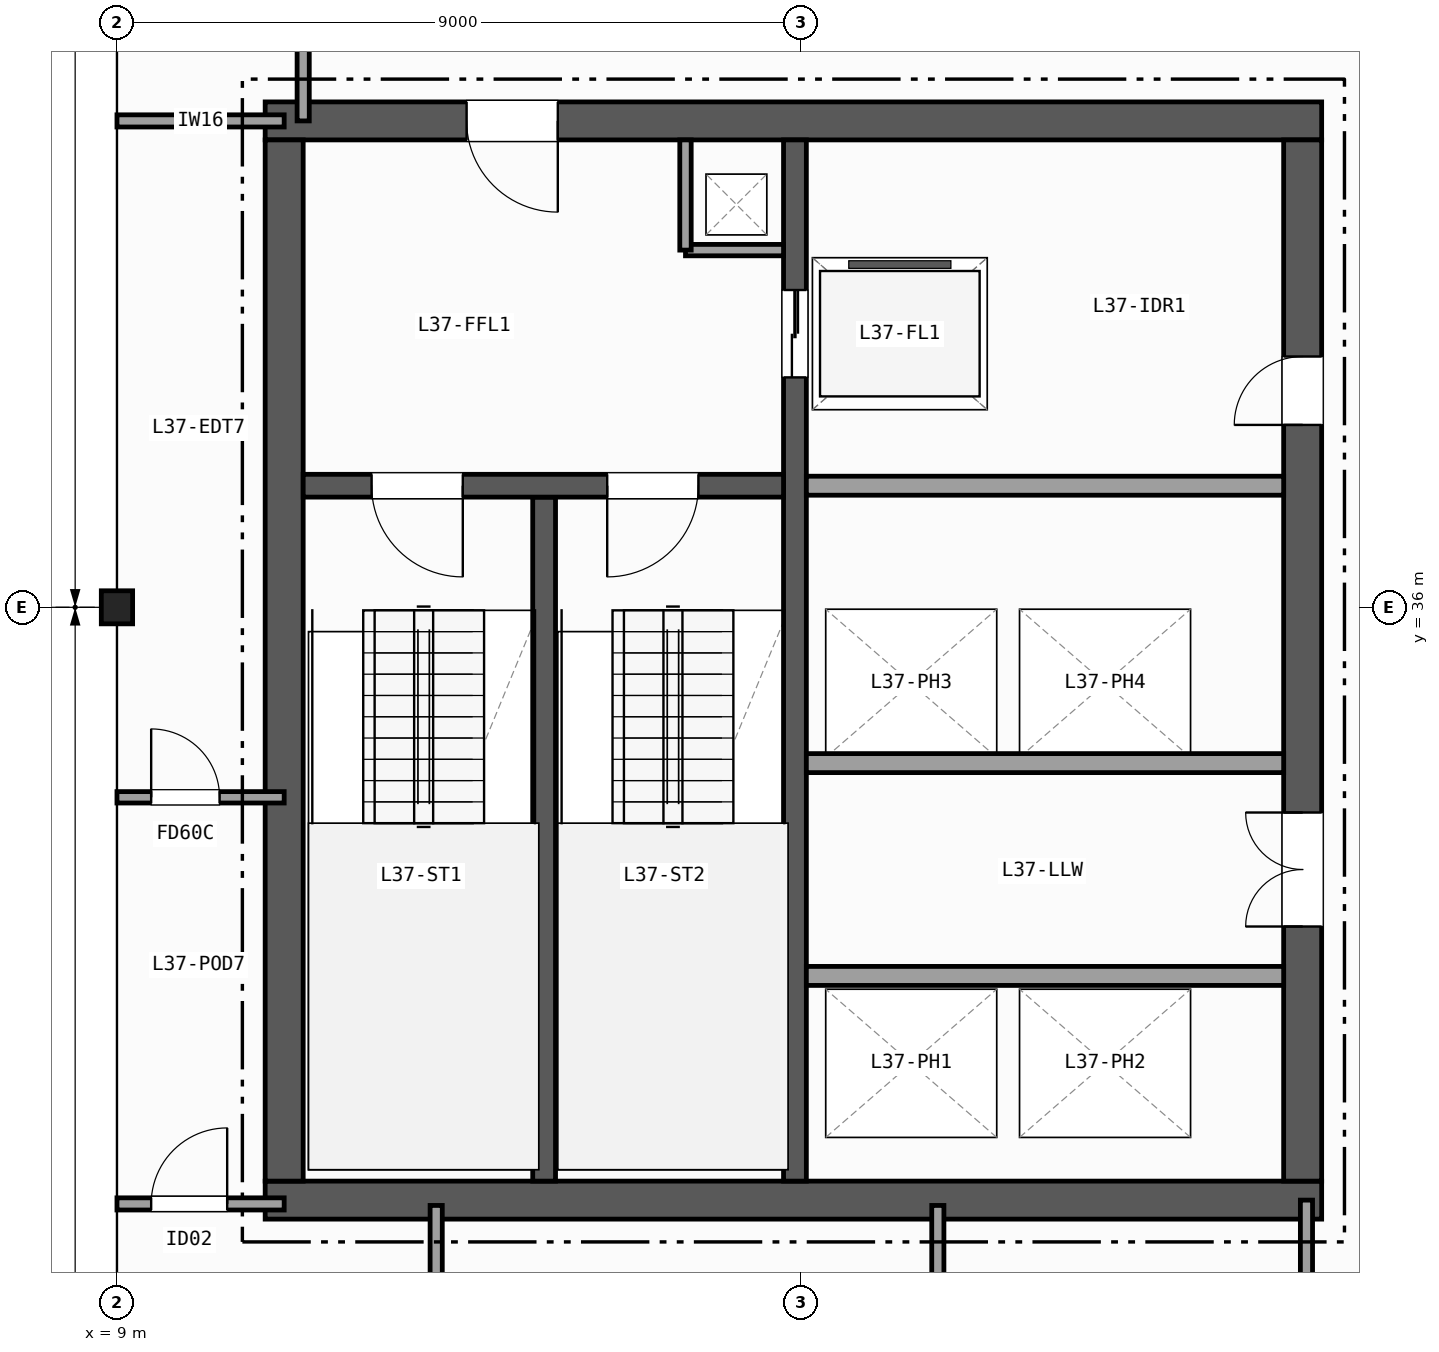
"""IFC4 building model, lengths in metres.
Left out: names, types, materials, properties, quantities, classifications, styles, units other than length and angle.
Written with IfcOpenShell. Run it as: python <this file> out.ifc"""

import sys

from ifc_helpers import new_model, si_unit, direction, frame, frame_2d, origin, origin_2d, place, context, subcontext, project, spatial, rectangle, i_section, extrude, element, fill, save


model = new_model("IFC4")
c1 = context("Model", 3, precision=1e-05, world=origin(), true_north=direction((0.0, 1.0)))
c2 = subcontext(c1, "Body", "Model", "MODEL_VIEW")
j1 = project(units=[si_unit("LENGTHUNIT", "METRE"), si_unit("PLANEANGLEUNIT", "RADIAN")], contexts=[c1])
p1 = place(None, origin())
s1 = spatial("IfcSite", under=j1, at=p1, CompositionType="ELEMENT")
p2 = place(p1, origin())
s2 = spatial("IfcBuilding", under=s1, at=p2, CompositionType="ELEMENT")
p3 = place(p2, frame((0.0, 0.0, 150.7)))
s3 = spatial("IfcBuildingStorey", under=s2, at=p3, CompositionType="ELEMENT", Elevation=150.7)
p4 = place(p3, frame((9.0, 36.0, 0.0), z_axis=(0.0, 0.0, 1.0), x_axis=(1.0, 0.0, 0.0)))
e1 = element("IfcColumn", 1, at=p4, inside=s3, PredefinedType="COLUMN", context=c2, shape_type="SweptSolid", body=[
    extrude(i_section(OverallWidth=0.412, OverallDepth=0.435, WebThickness=0.036, FlangeThickness=0.057, FilletRadius=0.015, at=origin_2d()), origin(), (0.0, 0.0, 1.0), 3.7),
])
p5 = place(p3, frame((10.95, 28.2, 0.0), z_axis=(0.0, 0.0, 1.0), x_axis=(1.0, 0.0, 0.0)))
e2 = element("IfcWall", 2, at=p5, inside=s3, PredefinedType="SHEAR", context=c2, shape_type="SweptSolid", body=[
    extrude(rectangle(XDim=13.9, YDim=0.5, at=frame_2d((6.95, 0.0))), origin(), (0.0, 0.0, 1.0), 3.42),
])
p6 = place(p3, frame((24.85, 42.4, 0.0), z_axis=(0.0, 0.0, 1.0), x_axis=(-1.0, 0.0, 0.0)))
e3 = element("IfcWall", 3, at=p6, inside=s3, PredefinedType="SHEAR", context=c2, shape_type="SweptSolid", body=[
    extrude(rectangle(XDim=13.9, YDim=0.5, at=frame_2d((6.95, 0.0))), origin(), (0.0, 0.0, 1.0), 3.42),
])
p7 = place(p6, frame((10.05, 0.0, 0.0)))
e4 = element("IfcOpeningElement", 4, at=p7, cuts=e3, PredefinedType="OPENING", context=c2, shape_type="SweptSolid", body=[
    extrude(rectangle(XDim=1.2, YDim=2.15, at=frame_2d((0.6, 1.075))), frame((0.0, 0.26, 0.0), z_axis=(0.0, -1.0, 0.0), x_axis=(1.0, 0.0, 0.0)), (0.0, 0.0, 1.0), 0.52),
])
p8 = place(p3, frame((11.2, 42.15, 0.0), z_axis=(0.0, 0.0, 1.0), x_axis=(0.0, -1.0, 0.0)))
e5 = element("IfcWall", 5, at=p8, inside=s3, PredefinedType="SHEAR", context=c2, shape_type="SweptSolid", body=[
    extrude(rectangle(XDim=13.7, YDim=0.5, at=frame_2d((6.85, 0.0))), origin(), (0.0, 0.0, 1.0), 3.42),
])
p9 = place(p3, frame((24.6, 28.45, 0.0), z_axis=(0.0, 0.0, 1.0), x_axis=(0.0, 1.0, 0.0)))
e6 = element("IfcWall", 6, at=p9, inside=s3, PredefinedType="SHEAR", context=c2, shape_type="SweptSolid", body=[
    extrude(rectangle(XDim=13.7, YDim=0.5, at=frame_2d((6.85, 0.0))), origin(), (0.0, 0.0, 1.0), 3.42),
])
p10 = place(p9, frame((3.35, 0.0, 0.0)))
e7 = element("IfcOpeningElement", 7, at=p10, cuts=e6, PredefinedType="OPENING", context=c2, shape_type="SweptSolid", body=[
    extrude(rectangle(XDim=1.5, YDim=2.2, at=frame_2d((0.75, 1.1))), frame((0.0, 0.26, 0.0), z_axis=(0.0, -1.0, 0.0), x_axis=(1.0, 0.0, 0.0)), (0.0, 0.0, 1.0), 0.52),
])
p11 = place(p9, frame((9.95, 0.0, 0.0)))
e8 = element("IfcOpeningElement", 8, at=p11, cuts=e6, PredefinedType="OPENING", context=c2, shape_type="SweptSolid", body=[
    extrude(rectangle(XDim=0.9, YDim=2.1, at=frame_2d((0.45, 1.05))), frame((0.0, 0.26, 0.0), z_axis=(0.0, -1.0, 0.0), x_axis=(1.0, 0.0, 0.0)), (0.0, 0.0, 1.0), 0.52),
])
p12 = place(p3, frame((14.62, 28.45, 0.0), z_axis=(0.0, 0.0, 1.0), x_axis=(0.0, 1.0, 0.0)))
e9 = element("IfcWall", 9, at=p12, inside=s3, PredefinedType="SHEAR", context=c2, shape_type="SweptSolid", body=[
    extrude(rectangle(XDim=9.0, YDim=0.3, at=frame_2d((4.5, 0.0))), origin(), (0.0, 0.0, 1.0), 3.42),
])
p13 = place(p3, frame((17.92, 42.15, 0.0), z_axis=(0.0, 0.0, 1.0), x_axis=(0.0, -1.0, 0.0)))
e10 = element("IfcWall", 10, at=p13, inside=s3, PredefinedType="SHEAR", context=c2, shape_type="SweptSolid", body=[
    extrude(rectangle(XDim=13.7, YDim=0.3, at=frame_2d((6.85, 0.0))), origin(), (0.0, 0.0, 1.0), 3.42),
])
p14 = place(p13, frame((1.975, 0.0, 0.0)))
e11 = element("IfcOpeningElement", 11, at=p14, cuts=e10, PredefinedType="OPENING", context=c2, shape_type="SweptSolid", body=[
    extrude(rectangle(XDim=1.15, YDim=2.15, at=frame_2d((0.575, 1.075))), frame((0.0, 0.16, 0.0), z_axis=(0.0, -1.0, 0.0), x_axis=(1.0, 0.0, 0.0)), (0.0, 0.0, 1.0), 0.32),
])
p15 = place(p3, frame((17.77, 37.6, 0.0), z_axis=(0.0, 0.0, 1.0), x_axis=(-1.0, 0.0, 0.0)))
e12 = element("IfcWall", 12, at=p15, inside=s3, PredefinedType="SHEAR", context=c2, shape_type="SweptSolid", body=[
    extrude(rectangle(XDim=6.32, YDim=0.3, at=frame_2d((3.16, 0.0))), origin(), (0.0, 0.0, 1.0), 3.42),
])
p16 = place(p15, frame((4.22, 0.0, 0.0)))
e13 = element("IfcOpeningElement", 13, at=p16, cuts=e12, PredefinedType="OPENING", context=c2, shape_type="SweptSolid", body=[
    extrude(rectangle(XDim=1.2, YDim=2.15, at=frame_2d((0.6, 1.075))), frame((0.0, 0.16, 0.0), z_axis=(0.0, -1.0, 0.0), x_axis=(1.0, 0.0, 0.0)), (0.0, 0.0, 1.0), 0.32),
])
p17 = place(p15, frame((1.12, 0.0, 0.0)))
e14 = element("IfcOpeningElement", 14, at=p17, cuts=e12, PredefinedType="OPENING", context=c2, shape_type="SweptSolid", body=[
    extrude(rectangle(XDim=1.2, YDim=2.15, at=frame_2d((0.6, 1.075))), frame((0.0, 0.16, 0.0), z_axis=(0.0, -1.0, 0.0), x_axis=(1.0, 0.0, 0.0)), (0.0, 0.0, 1.0), 0.32),
])
p18 = place(p3, frame((16.48, 40.7, 0.0), z_axis=(0.0, 0.0, 1.0), x_axis=(1.0, 0.0, 0.0)))
e15 = element("IfcWall", 15, at=p18, inside=s3, PredefinedType="PARTITIONING", context=c2, shape_type="SweptSolid", body=[
    extrude(rectangle(XDim=1.29, YDim=0.15, at=frame_2d((0.645, 0.0))), origin(), (0.0, 0.0, 1.0), 3.42),
])
p19 = place(p3, frame((16.48, 40.7, 0.0), z_axis=(0.0, 0.0, 1.0), x_axis=(0.0, 1.0, 0.0)))
e16 = element("IfcWall", 16, at=p19, inside=s3, PredefinedType="PARTITIONING", context=c2, shape_type="SweptSolid", body=[
    extrude(rectangle(XDim=1.45, YDim=0.15, at=frame_2d((0.725, 0.0))), origin(), (0.0, 0.0, 1.0), 3.42),
])
for number, where, z_axis, x_axis in (
    (17, (18.07, 37.6, 0.0), (0.0, 0.0, 1.0), (1.0, 0.0, 0.0)),
    (18, (18.07, 31.15, 0.0), (0.0, 0.0, 1.0), (1.0, 0.0, 0.0)),
    (19, (24.35, 33.95, 0.0), (0.0, 0.0, 1.0), (-1.0, 0.0, 0.0)),
):
    element("IfcWall", number, at=place(p3, frame(where, z_axis=z_axis, x_axis=x_axis)), inside=s3, PredefinedType="PARTITIONING", context=c2, shape_type="SweptSolid", body=[
        extrude(rectangle(XDim=6.28, YDim=0.25, at=frame_2d((3.14, 0.0))), origin(), (0.0, 0.0, 1.0), 3.42),
    ])
p20 = place(p3, frame((9.0, 28.15, 0.0), z_axis=(0.0, 0.0, 1.0), x_axis=(1.0, 0.0, 0.0)))
e20 = element("IfcWall", 20, at=p20, inside=s3, PredefinedType="PARTITIONING", context=c2, shape_type="SweptSolid", body=[
    extrude(rectangle(XDim=2.2, YDim=0.16, at=frame_2d((1.1, 0.0))), origin(), (0.0, 0.0, 1.0), 2.634),
])
p21 = place(p20, frame((0.45, 0.0, 0.0)))
e21 = element("IfcOpeningElement", 21, at=p21, cuts=e20, PredefinedType="OPENING", context=c2, shape_type="SweptSolid", body=[
    extrude(rectangle(XDim=1.0, YDim=2.1, at=frame_2d((0.5, 1.05))), frame((0.0, 0.09, 0.0), z_axis=(0.0, -1.0, 0.0), x_axis=(1.0, 0.0, 0.0)), (0.0, 0.0, 1.0), 0.18),
])
p22 = place(p3, frame((9.0, 42.4, 0.0), z_axis=(0.0, 0.0, 1.0), x_axis=(1.0, 0.0, 0.0)))
e22 = element("IfcWall", 22, at=p22, inside=s3, PredefinedType="PARTITIONING", context=c2, shape_type="SweptSolid", body=[
    extrude(rectangle(XDim=2.2, YDim=0.16, at=frame_2d((1.1, 0.0))), origin(), (0.0, 0.0, 1.0), 2.634),
])
p23 = place(p3, frame((11.45, 42.4, 0.0), z_axis=(0.0, 0.0, 1.0), x_axis=(0.0, 1.0, 0.0)))
e23 = element("IfcWall", 23, at=p23, inside=s3, PredefinedType="PARTITIONING", context=c2, shape_type="SweptSolid", body=[
    extrude(rectangle(XDim=2.1, YDim=0.16, at=frame_2d((1.05, 0.0))), origin(), (0.0, 0.0, 1.0), 3.42),
])
p24 = place(p3, frame((9.0, 33.5, 0.0), z_axis=(0.0, 0.0, 1.0), x_axis=(1.0, 0.0, 0.0)))
e24 = element("IfcWall", 24, at=p24, inside=s3, PredefinedType="PARTITIONING", context=c2, shape_type="SweptSolid", body=[
    extrude(rectangle(XDim=2.2, YDim=0.15, at=frame_2d((1.1, 0.0))), origin(), (0.0, 0.0, 1.0), 2.634),
])
p25 = place(p24, frame((0.45, 0.0, 0.0)))
e25 = element("IfcOpeningElement", 25, at=p25, cuts=e24, PredefinedType="OPENING", context=c2, shape_type="SweptSolid", body=[
    extrude(rectangle(XDim=0.9, YDim=2.1, at=frame_2d((0.45, 1.05))), frame((0.0, 0.085, 0.0), z_axis=(0.0, -1.0, 0.0), x_axis=(1.0, 0.0, 0.0)), (0.0, 0.0, 1.0), 0.17),
])
p26 = place(p3, frame((24.65, 9.0, 0.0), z_axis=(0.0, 0.0, 1.0), x_axis=(0.0, 1.0, 0.0)))
e26 = element("IfcWall", 26, at=p26, inside=s3, PredefinedType="PARTITIONING", context=c2, shape_type="SweptSolid", body=[
    extrude(rectangle(XDim=19.2, YDim=0.16, at=frame_2d((9.6, 0.0))), origin(), (0.0, 0.0, 1.0), 2.634),
])
p27 = place(p26, frame((12.2, 0.0, 0.0)))
e27 = element("IfcOpeningElement", 27, at=p27, cuts=e26, PredefinedType="OPENING", context=c2, shape_type="SweptSolid", body=[
    extrude(rectangle(XDim=1.2, YDim=2.15, at=frame_2d((0.6, 1.075))), frame((0.0, 0.09, 0.0), z_axis=(0.0, -1.0, 0.0), x_axis=(1.0, 0.0, 0.0)), (0.0, 0.0, 1.0), 0.18),
])
p28 = place(p26, frame((4.2, 0.0, 0.0)))
e28 = element("IfcOpeningElement", 28, at=p28, cuts=e26, PredefinedType="OPENING", context=c2, shape_type="SweptSolid", body=[
    extrude(rectangle(XDim=0.86, YDim=2.05, at=frame_2d((0.43, 1.025))), frame((0.0, 0.09, 0.0), z_axis=(0.0, -1.0, 0.0), x_axis=(1.0, 0.0, 0.0)), (0.0, 0.0, 1.0), 0.18),
])
p29 = place(p3, frame((13.2, 18.0, 0.0), z_axis=(0.0, 0.0, 1.0), x_axis=(0.0, 1.0, 0.0)))
e29 = element("IfcWall", 29, at=p29, inside=s3, PredefinedType="PARTITIONING", context=c2, shape_type="SweptSolid", body=[
    extrude(rectangle(XDim=10.13, YDim=0.16, at=frame_2d((5.065, 0.0))), origin(), (0.0, 0.0, 1.0), 2.789),
])
p30 = place(p29, frame((2.5, 0.0, 0.0)))
e30 = element("IfcOpeningElement", 30, at=p30, cuts=e29, PredefinedType="OPENING", context=c2, shape_type="SweptSolid", body=[
    extrude(rectangle(XDim=0.95, YDim=2.1, at=frame_2d((0.475, 1.05))), frame((0.0, 0.09, 0.0), z_axis=(0.0, -1.0, 0.0), x_axis=(1.0, 0.0, 0.0)), (0.0, 0.0, 1.0), 0.18),
])
p31 = place(p3, frame((19.8, 18.0, 0.0), z_axis=(0.0, 0.0, 1.0), x_axis=(0.0, 1.0, 0.0)))
e31 = element("IfcWall", 31, at=p31, inside=s3, PredefinedType="PARTITIONING", context=c2, shape_type="SweptSolid", body=[
    extrude(rectangle(XDim=10.13, YDim=0.16, at=frame_2d((5.065, 0.0))), origin(), (0.0, 0.0, 1.0), 2.789),
])
p32 = place(p31, frame((2.5, 0.0, 0.0)))
e32 = element("IfcOpeningElement", 32, at=p32, cuts=e31, PredefinedType="OPENING", context=c2, shape_type="SweptSolid", body=[
    extrude(rectangle(XDim=1.0, YDim=2.1, at=frame_2d((0.5, 1.05))), frame((0.0, 0.09, 0.0), z_axis=(0.0, -1.0, 0.0), x_axis=(1.0, 0.0, 0.0)), (0.0, 0.0, 1.0), 0.18),
])
p33 = place(p16, origin())
e33 = element("IfcDoor", 33, at=p33, inside=s3, OperationType="SINGLE_SWING_LEFT", PredefinedType="DOOR", context=c2, shape_type="SweptSolid", body=[
    extrude(rectangle(XDim=1.2, YDim=2.15, at=frame_2d((0.6, 1.075))), frame((0.0, 0.025, 0.0), z_axis=(0.0, -1.0, 0.0), x_axis=(1.0, 0.0, 0.0)), (0.0, 0.0, 1.0), 0.05),
])
fill(e13, e33)
p34 = place(p17, origin())
e34 = element("IfcDoor", 34, at=p34, inside=s3, OperationType="SINGLE_SWING_RIGHT", PredefinedType="DOOR", context=c2, shape_type="SweptSolid", body=[
    extrude(rectangle(XDim=1.2, YDim=2.15, at=frame_2d((0.6, 1.075))), frame((0.0, 0.025, 0.0), z_axis=(0.0, -1.0, 0.0), x_axis=(1.0, 0.0, 0.0)), (0.0, 0.0, 1.0), 0.05),
])
fill(e14, e34)
p35 = place(p10, origin())
e35 = element("IfcDoor", 35, at=p35, inside=s3, OperationType="DOUBLE_DOOR_SINGLE_SWING", PredefinedType="DOOR", context=c2, shape_type="SweptSolid", body=[
    extrude(rectangle(XDim=1.5, YDim=2.2, at=frame_2d((0.75, 1.1))), frame((0.0, 0.025, 0.0), z_axis=(0.0, -1.0, 0.0), x_axis=(1.0, 0.0, 0.0)), (0.0, 0.0, 1.0), 0.05),
])
fill(e7, e35)
p36 = place(p7, origin())
e36 = element("IfcDoor", 36, at=p36, inside=s3, OperationType="SINGLE_SWING_LEFT", PredefinedType="DOOR", context=c2, shape_type="SweptSolid", body=[
    extrude(rectangle(XDim=1.2, YDim=2.15, at=frame_2d((0.6, 1.075))), frame((0.0, 0.025, 0.0), z_axis=(0.0, -1.0, 0.0), x_axis=(1.0, 0.0, 0.0)), (0.0, 0.0, 1.0), 0.05),
])
fill(e4, e36)
p37 = place(p11, origin())
e37 = element("IfcDoor", 37, at=p37, inside=s3, OperationType="SINGLE_SWING_LEFT", PredefinedType="DOOR", context=c2, shape_type="SweptSolid", body=[
    extrude(rectangle(XDim=0.9, YDim=2.1, at=frame_2d((0.45, 1.05))), frame((0.0, 0.025, 0.0), z_axis=(0.0, -1.0, 0.0), x_axis=(1.0, 0.0, 0.0)), (0.0, 0.0, 1.0), 0.05),
])
fill(e8, e37)
p38 = place(p14, origin())
e38 = element("IfcDoor", 38, at=p38, inside=s3, OperationType="DOUBLE_DOOR_SLIDING", PredefinedType="DOOR", context=c2, shape_type="SweptSolid", body=[
    extrude(rectangle(XDim=1.15, YDim=2.15, at=frame_2d((0.575, 1.075))), frame((0.0, 0.025, 0.0), z_axis=(0.0, -1.0, 0.0), x_axis=(1.0, 0.0, 0.0)), (0.0, 0.0, 1.0), 0.05),
])
fill(e11, e38)
p39 = place(p21, origin())
e39 = element("IfcDoor", 39, at=p39, inside=s3, OperationType="SINGLE_SWING_RIGHT", PredefinedType="DOOR", context=c2, shape_type="SweptSolid", body=[
    extrude(rectangle(XDim=1.0, YDim=2.1, at=frame_2d((0.5, 1.05))), frame((0.0, 0.025, 0.0), z_axis=(0.0, -1.0, 0.0), x_axis=(1.0, 0.0, 0.0)), (0.0, 0.0, 1.0), 0.05),
])
fill(e21, e39)
p40 = place(p25, origin())
e40 = element("IfcDoor", 40, at=p40, inside=s3, OperationType="SINGLE_SWING_LEFT", PredefinedType="DOOR", context=c2, shape_type="SweptSolid", body=[
    extrude(rectangle(XDim=0.9, YDim=2.1, at=frame_2d((0.45, 1.05))), frame((0.0, 0.025, 0.0), z_axis=(0.0, -1.0, 0.0), x_axis=(1.0, 0.0, 0.0)), (0.0, 0.0, 1.0), 0.05),
])
fill(e25, e40)
save(model, sys.argv[1])
